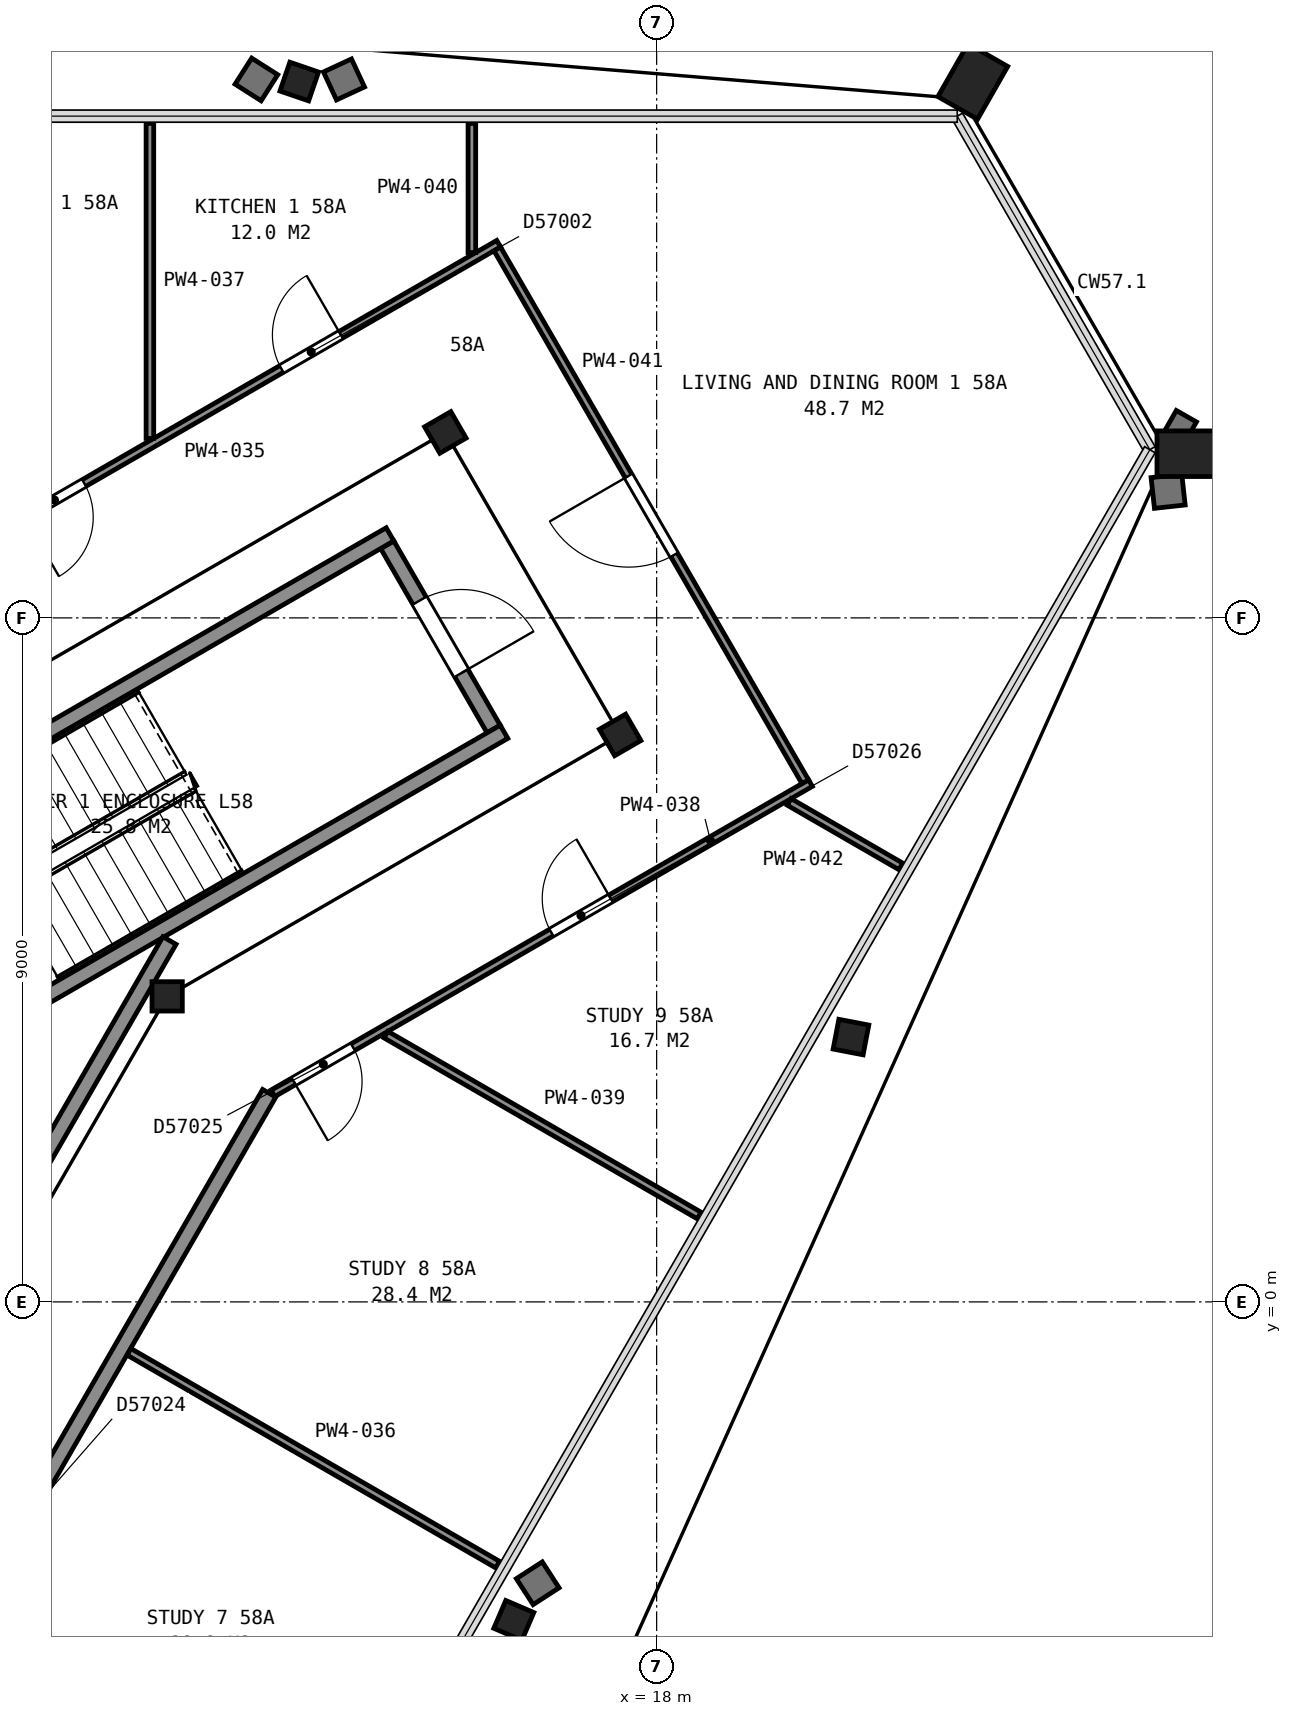
"""IFC4 building model, lengths in metres.
Left out: names, types, materials, properties, quantities, classifications, styles, units other than length and angle.
Written with IfcOpenShell. Run it as: python <this file> out.ifc"""

import sys

from ifc_helpers import new_model, si_unit, direction, frame, frame_2d, origin, origin_2d, place, context, subcontext, project, spatial, rectangle, hollow_rectangle, i_section, extrude, element, fill, save


model = new_model("IFC4")
c1 = context("Model", 3, precision=1e-05, world=origin(), true_north=direction((0.0, 1.0)))
c2 = subcontext(c1, "Body", "Model", "MODEL_VIEW")
j1 = project(units=[si_unit("LENGTHUNIT", "METRE"), si_unit("PLANEANGLEUNIT", "RADIAN")], contexts=[c1])
p1 = place(None, origin())
s1 = spatial("IfcSite", under=j1, at=p1, CompositionType="ELEMENT")
p2 = place(p1, origin())
s2 = spatial("IfcBuilding", under=s1, at=p2, CompositionType="ELEMENT")
p3 = place(p2, frame((0.0, 0.0, 232.3)))
s3 = spatial("IfcBuildingStorey", under=s2, at=p3, CompositionType="ELEMENT", Elevation=232.3)
p4 = place(p3, frame((22.037, 15.842, 0.065), z_axis=(0.105639145209, 0.18481839067, 0.977078570776), x_axis=(0.496911060929, -0.860913522908, 0.109120592015)))
e1 = element("IfcColumn", 1, at=p4, inside=s3, PredefinedType="COLUMN", context=c2, shape_type="SweptSolid", body=[
    extrude(hollow_rectangle(XDim=0.6, YDim=0.8, WallThickness=0.05, at=origin_2d()), origin(), (0.0, 0.0, 1.0), 3.654),
])
p5 = place(p3, frame((13.222, 15.837, 0.035), z_axis=(0.063574032022, 0.185512190953, 0.980583280227), x_axis=(0.997903164176, 0.000145439702, -0.064724444963)))
e2 = element("IfcColumn", 2, at=p5, inside=s3, PredefinedType="COLUMN", context=c2, shape_type="SweptSolid", body=[
    extrude(i_section(OverallWidth=0.401, OverallDepth=0.399, WebThickness=0.025, FlangeThickness=0.04, FilletRadius=0.015, at=origin_2d()), origin(), (0.0, 0.0, 1.0), 3.702),
])
p6 = place(p3, frame((15.916, -4.103, 0.035), z_axis=(0.172603021318, -0.074378492921, 0.982179228462), x_axis=(-0.499986606679, -0.865745882945, 0.022303795753)))
e3 = element("IfcColumn", 3, at=p6, inside=s3, PredefinedType="COLUMN", context=c2, shape_type="SweptSolid", body=[
    extrude(i_section(OverallWidth=0.401, OverallDepth=0.399, WebThickness=0.025, FlangeThickness=0.04, FilletRadius=0.015, at=origin_2d()), origin(), (0.0, 0.0, 1.0), 3.696),
])
p7 = place(p3, frame((20.328, 3.529, 0.04), z_axis=(0.19341182923, -0.037095396991, 0.980416134015), x_axis=(-0.498932099925, -0.864144788984, 0.065730840066)))
e4 = element("IfcColumn", 4, at=p7, inside=s3, PredefinedType="COLUMN", context=c2, shape_type="SweptSolid", body=[
    extrude(i_section(OverallWidth=0.401, OverallDepth=0.399, WebThickness=0.025, FlangeThickness=0.04, FilletRadius=0.015, at=origin_2d()), origin(), (0.0, 0.0, 1.0), 3.692),
])
p8 = place(p3, frame((24.734, 11.16, 0.065), z_axis=(0.213902075885, 0.0, 0.976855107952), x_axis=(0.497026354192, -0.860883256594, -0.108833918219)))
e5 = element("IfcColumn", 5, at=p8, inside=s3, PredefinedType="COLUMN", context=c2, shape_type="SweptSolid", body=[
    extrude(hollow_rectangle(XDim=0.6, YDim=0.8, WallThickness=0.05, at=origin_2d()), origin(), (0.0, 0.0, 1.0), 3.655),
])
p9 = place(p3, frame((11.56, 4.02, 0.0), z_axis=(0.0, 0.0, 1.0), x_axis=(1.0, 0.0, 0.0)))
e6 = element("IfcColumn", 6, at=p9, inside=s3, PredefinedType="COLUMN", context=c2, shape_type="SweptSolid", body=[
    extrude(i_section(OverallWidth=0.399, OverallDepth=0.386, WebThickness=0.021, FlangeThickness=0.033, FilletRadius=0.015, at=origin_2d()), origin(), (0.0, 0.0, 1.0), 3.7),
])
for number, where, z_axis, x_axis in (
    (7, (17.52, 7.46, 0.0), (0.0, 0.0, 1.0), (0.5, -0.866, 0.0)),
    (8, (15.22, 11.44, 0.0), (0.0, 0.0, 1.0), (0.5, -0.866, 0.0)),
):
    element("IfcColumn", number, at=place(p3, frame(where, z_axis=z_axis, x_axis=x_axis)), inside=s3, PredefinedType="COLUMN", context=c2, shape_type="SweptSolid", body=[
        extrude(i_section(OverallWidth=0.401, OverallDepth=0.399, WebThickness=0.025, FlangeThickness=0.04, FilletRadius=0.015, at=origin_2d()), origin(), (0.0, 0.0, 1.0), 3.7),
    ])
p10 = place(p3, frame((15.855, 7.538, 0.0), z_axis=(0.0, 0.0, 1.0), x_axis=(-0.500049511043, 0.865996816683, 0.0)))
e9 = element("IfcWall", 9, at=p10, inside=s3, PredefinedType="PARTITIONING", context=c2, shape_type="SweptSolid", body=[
    extrude(rectangle(XDim=2.8, YDim=0.2, at=frame_2d((1.4, 0.0))), origin(), (0.0, 0.0, 1.0), 3.45),
])
p11 = place(p10, frame((0.85, 0.0, 0.0)))
e10 = element("IfcOpeningElement", 10, at=p11, cuts=e9, PredefinedType="OPENING", context=c2, shape_type="SweptSolid", body=[
    extrude(rectangle(XDim=1.1, YDim=2.1, at=frame_2d((0.55, 1.05))), frame((0.0, 0.11, 0.0), z_axis=(0.0, -1.0, 0.0), x_axis=(1.0, 0.0, 0.0)), (0.0, 0.0, 1.0), 0.22),
])
for number, where, z_axis, x_axis in (
    (11, (6.178, 5.299, 0.0), (0.0, 0.0, 1.0), (0.866, 0.5, 0.0)),
    (12, (7.678, 2.701, 0.0), (0.0, 0.0, 1.0), (0.866, 0.5, 0.0)),
):
    element("IfcWall", number, at=place(p3, frame(where, z_axis=z_axis, x_axis=x_axis)), inside=s3, PredefinedType="PARTITIONING", context=c2, shape_type="SweptSolid", body=[
        extrude(rectangle(XDim=9.6, YDim=0.2, at=frame_2d((4.8, 0.0))), origin(), (0.0, 0.0, 1.0), 3.45),
    ])
p12 = place(p3, frame((9.803, 1.658, 0.0), z_axis=(0.0, 0.0, 1.0), x_axis=(0.499943114462, 0.866058244174, 0.0)))
e13 = element("IfcWall", 13, at=p12, inside=s3, PredefinedType="PARTITIONING", context=c2, shape_type="SweptSolid", body=[
    extrude(rectangle(XDim=3.576, YDim=0.2, at=frame_2d((1.788, 0.0))), origin(), (0.0, 0.0, 1.0), 3.45),
])
p13 = place(p3, frame((12.903, 2.745, 0.0), z_axis=(0.0, 0.0, 1.0), x_axis=(-0.499999743747, -0.866025551732, 0.0)))
e14 = element("IfcWall", 14, at=p13, inside=s3, PredefinedType="PARTITIONING", context=c2, shape_type="SweptSolid", body=[
    extrude(rectangle(XDim=17.656, YDim=0.2, at=frame_2d((8.828, 0.0))), origin(), (0.0, 0.0, 1.0), 2.713),
])
p14 = place(p13, frame((10.134, 0.0, 0.0)))
e15 = element("IfcOpeningElement", 15, at=p14, cuts=e14, PredefinedType="OPENING", context=c2, shape_type="SweptSolid", body=[
    extrude(rectangle(XDim=0.9, YDim=2.1, at=frame_2d((0.45, 1.05))), frame((0.0, 0.11, 0.0), z_axis=(0.0, -1.0, 0.0), x_axis=(1.0, 0.0, 0.0)), (0.0, 0.0, 1.0), 0.22),
])
p15 = place(p13, frame((6.073, 0.0, 0.0)))
e16 = element("IfcOpeningElement", 16, at=p15, cuts=e14, PredefinedType="OPENING", context=c2, shape_type="SweptSolid", body=[
    extrude(rectangle(XDim=0.9, YDim=2.1, at=frame_2d((0.45, 1.05))), frame((0.0, 0.11, 0.0), z_axis=(0.0, -1.0, 0.0), x_axis=(1.0, 0.0, 0.0)), (0.0, 0.0, 1.0), 0.22),
])
p16 = place(p3, frame((8.852, 9.843, 0.0), z_axis=(0.0, 0.0, 1.0), x_axis=(0.866088973199, 0.499889878377, 0.0)))
e17 = element("IfcWall", 17, at=p16, inside=s3, PredefinedType="PARTITIONING", context=c2, shape_type="SweptSolid", body=[
    extrude(rectangle(XDim=8.163, YDim=0.1, at=frame_2d((4.082, 0.0))), origin(), (0.0, 0.0, 1.0), 2.713),
])
p17 = place(p16, frame((4.865, 0.0, 0.0)))
e18 = element("IfcOpeningElement", 18, at=p17, cuts=e17, PredefinedType="OPENING", context=c2, shape_type="SweptSolid", body=[
    extrude(rectangle(XDim=0.9, YDim=2.1, at=frame_2d((0.45, 1.05))), frame((0.0, 0.06, 0.0), z_axis=(0.0, -1.0, 0.0), x_axis=(1.0, 0.0, 0.0)), (0.0, 0.0, 1.0), 0.12),
])
p18 = place(p16, frame((0.965, 0.0, 0.0)))
e19 = element("IfcOpeningElement", 19, at=p18, cuts=e17, PredefinedType="OPENING", context=c2, shape_type="SweptSolid", body=[
    extrude(rectangle(XDim=0.9, YDim=2.1, at=frame_2d((0.45, 1.05))), frame((0.0, 0.06, 0.0), z_axis=(0.0, -1.0, 0.0), x_axis=(1.0, 0.0, 0.0)), (0.0, 0.0, 1.0), 0.12),
])
p19 = place(p3, frame((11.059, -0.657, 0.0), z_axis=(0.0, 0.0, 1.0), x_axis=(0.866064348871, -0.499932539064, 0.0)))
e20 = element("IfcWall", 20, at=p19, inside=s3, PredefinedType="PARTITIONING", context=c2, shape_type="SweptSolid", body=[
    extrude(rectangle(XDim=5.6, YDim=0.1, at=frame_2d((2.8, 0.0))), origin(), (0.0, 0.0, 1.0), 2.713),
])
p20 = place(p3, frame((11.333, 11.362, 0.0), z_axis=(0.0, 0.0, 1.0), x_axis=(0.0, 1.0, 0.0)))
e21 = element("IfcWall", 21, at=p20, inside=s3, PredefinedType="PARTITIONING", context=c2, shape_type="SweptSolid", body=[
    extrude(rectangle(XDim=4.145, YDim=0.1, at=frame_2d((2.072, 0.0))), origin(), (0.0, 0.0, 1.0), 2.713),
])
p21 = place(p3, frame((20.023, 6.826, 0.0), z_axis=(0.0, 0.0, 1.0), x_axis=(-0.86608949446, -0.499888975259, 0.0)))
e22 = element("IfcWall", 22, at=p21, inside=s3, PredefinedType="PARTITIONING", context=c2, shape_type="SweptSolid", body=[
    extrude(rectangle(XDim=8.165, YDim=0.1, at=frame_2d((4.083, 0.0))), origin(), (0.0, 0.0, 1.0), 2.713),
])
p22 = place(p21, frame((6.95, 0.0, 0.0)))
e23 = element("IfcOpeningElement", 23, at=p22, cuts=e22, PredefinedType="OPENING", context=c2, shape_type="SweptSolid", body=[
    extrude(rectangle(XDim=0.9, YDim=2.1, at=frame_2d((0.45, 1.05))), frame((0.0, 0.06, 0.0), z_axis=(0.0, -1.0, 0.0), x_axis=(1.0, 0.0, 0.0)), (0.0, 0.0, 1.0), 0.12),
])
p23 = place(p21, frame((3.035, 0.0, 0.0)))
e24 = element("IfcOpeningElement", 24, at=p23, cuts=e22, PredefinedType="OPENING", context=c2, shape_type="SweptSolid", body=[
    extrude(rectangle(XDim=0.9, YDim=2.1, at=frame_2d((0.45, 1.05))), frame((0.0, 0.06, 0.0), z_axis=(0.0, -1.0, 0.0), x_axis=(1.0, 0.0, 0.0)), (0.0, 0.0, 1.0), 0.12),
])
p24 = place(p3, frame((14.438, 3.517, 0.0), z_axis=(0.0, 0.0, 1.0), x_axis=(0.866006230416, -0.500033207779, 0.0)))
e25 = element("IfcWall", 25, at=p24, inside=s3, PredefinedType="PARTITIONING", context=c2, shape_type="SweptSolid", body=[
    extrude(rectangle(XDim=4.76, YDim=0.1, at=frame_2d((2.38, 0.0))), origin(), (0.0, 0.0, 1.0), 2.713),
])
p25 = place(p3, frame((15.569, 13.807, 0.0), z_axis=(0.0, 0.0, 1.0), x_axis=(0.0, 1.0, 0.0)))
e26 = element("IfcWall", 26, at=p25, inside=s3, PredefinedType="PARTITIONING", context=c2, shape_type="SweptSolid", body=[
    extrude(rectangle(XDim=1.699, YDim=0.1, at=frame_2d((0.85, 0.0))), origin(), (0.0, 0.0, 1.0), 2.713),
])
p26 = place(p3, frame((15.903, 13.855, 0.0), z_axis=(0.0, 0.0, 1.0), x_axis=(0.500415732313, -0.865785247537, 0.0)))
e27 = element("IfcWall", 27, at=p26, inside=s3, PredefinedType="PARTITIONING", context=c2, shape_type="SweptSolid", body=[
    extrude(rectangle(XDim=8.097, YDim=0.1, at=frame_2d((4.049, 0.0))), origin(), (0.0, 0.0, 1.0), 2.713),
])
p27 = place(p26, frame((3.45, 0.0, 0.0)))
e28 = element("IfcOpeningElement", 28, at=p27, cuts=e27, PredefinedType="OPENING", context=c2, shape_type="SweptSolid", body=[
    extrude(rectangle(XDim=1.2, YDim=2.1, at=frame_2d((0.6, 1.05))), frame((0.0, 0.06, 0.0), z_axis=(0.0, -1.0, 0.0), x_axis=(1.0, 0.0, 0.0)), (0.0, 0.0, 1.0), 0.12),
])
p28 = place(p3, frame((19.743, 6.579, 0.0), z_axis=(0.0, 0.0, 1.0), x_axis=(0.866003515251, -0.500037910135, 0.0)))
e29 = element("IfcWall", 29, at=p28, inside=s3, PredefinedType="PARTITIONING", context=c2, shape_type="SweptSolid", body=[
    extrude(rectangle(XDim=1.697, YDim=0.1, at=frame_2d((0.849, 0.0))), origin(), (0.0, 0.0, 1.0), 2.713),
])
p29 = place(p11, origin())
e30 = element("IfcDoor", 30, at=p29, inside=s3, OperationType="SINGLE_SWING_LEFT", PredefinedType="DOOR", context=c2, shape_type="SweptSolid", body=[
    extrude(rectangle(XDim=1.1, YDim=2.1, at=frame_2d((0.55, 1.05))), frame((0.0, 0.025, 0.0), z_axis=(0.0, -1.0, 0.0), x_axis=(1.0, 0.0, 0.0)), (0.0, 0.0, 1.0), 0.05),
])
fill(e10, e30)
p30 = place(p17, origin())
e31 = element("IfcDoor", 31, at=p30, inside=s3, OperationType="SINGLE_SWING_RIGHT", PredefinedType="DOOR", context=c2, shape_type="SweptSolid", body=[
    extrude(rectangle(XDim=0.9, YDim=2.1, at=frame_2d((0.45, 1.05))), frame((0.0, 0.025, 0.0), z_axis=(0.0, -1.0, 0.0), x_axis=(1.0, 0.0, 0.0)), (0.0, 0.0, 1.0), 0.05),
])
fill(e18, e31)
p31 = place(p18, origin())
e32 = element("IfcDoor", 32, at=p31, inside=s3, OperationType="SINGLE_SWING_LEFT", PredefinedType="DOOR", context=c2, shape_type="SweptSolid", body=[
    extrude(rectangle(XDim=0.9, YDim=2.1, at=frame_2d((0.45, 1.05))), frame((0.0, 0.025, 0.0), z_axis=(0.0, -1.0, 0.0), x_axis=(1.0, 0.0, 0.0)), (0.0, 0.0, 1.0), 0.05),
])
fill(e19, e32)
p32 = place(p22, origin())
e33 = element("IfcDoor", 33, at=p32, inside=s3, OperationType="SINGLE_SWING_RIGHT", PredefinedType="DOOR", context=c2, shape_type="SweptSolid", body=[
    extrude(rectangle(XDim=0.9, YDim=2.1, at=frame_2d((0.45, 1.05))), frame((0.0, 0.025, 0.0), z_axis=(0.0, -1.0, 0.0), x_axis=(1.0, 0.0, 0.0)), (0.0, 0.0, 1.0), 0.05),
])
fill(e23, e33)
p33 = place(p23, origin())
e34 = element("IfcDoor", 34, at=p33, inside=s3, OperationType="SINGLE_SWING_LEFT", PredefinedType="DOOR", context=c2, shape_type="SweptSolid", body=[
    extrude(rectangle(XDim=0.9, YDim=2.1, at=frame_2d((0.45, 1.05))), frame((0.0, 0.025, 0.0), z_axis=(0.0, -1.0, 0.0), x_axis=(1.0, 0.0, 0.0)), (0.0, 0.0, 1.0), 0.05),
])
fill(e24, e34)
p34 = place(p27, origin())
e35 = element("IfcDoor", 35, at=p34, inside=s3, OperationType="SINGLE_SWING_LEFT", PredefinedType="DOOR", context=c2, shape_type="SweptSolid", body=[
    extrude(rectangle(XDim=1.2, YDim=2.1, at=frame_2d((0.6, 1.05))), frame((0.0, 0.025, 0.0), z_axis=(0.0, -1.0, 0.0), x_axis=(1.0, 0.0, 0.0)), (0.0, 0.0, 1.0), 0.05),
])
fill(e28, e35)
save(model, sys.argv[1])
